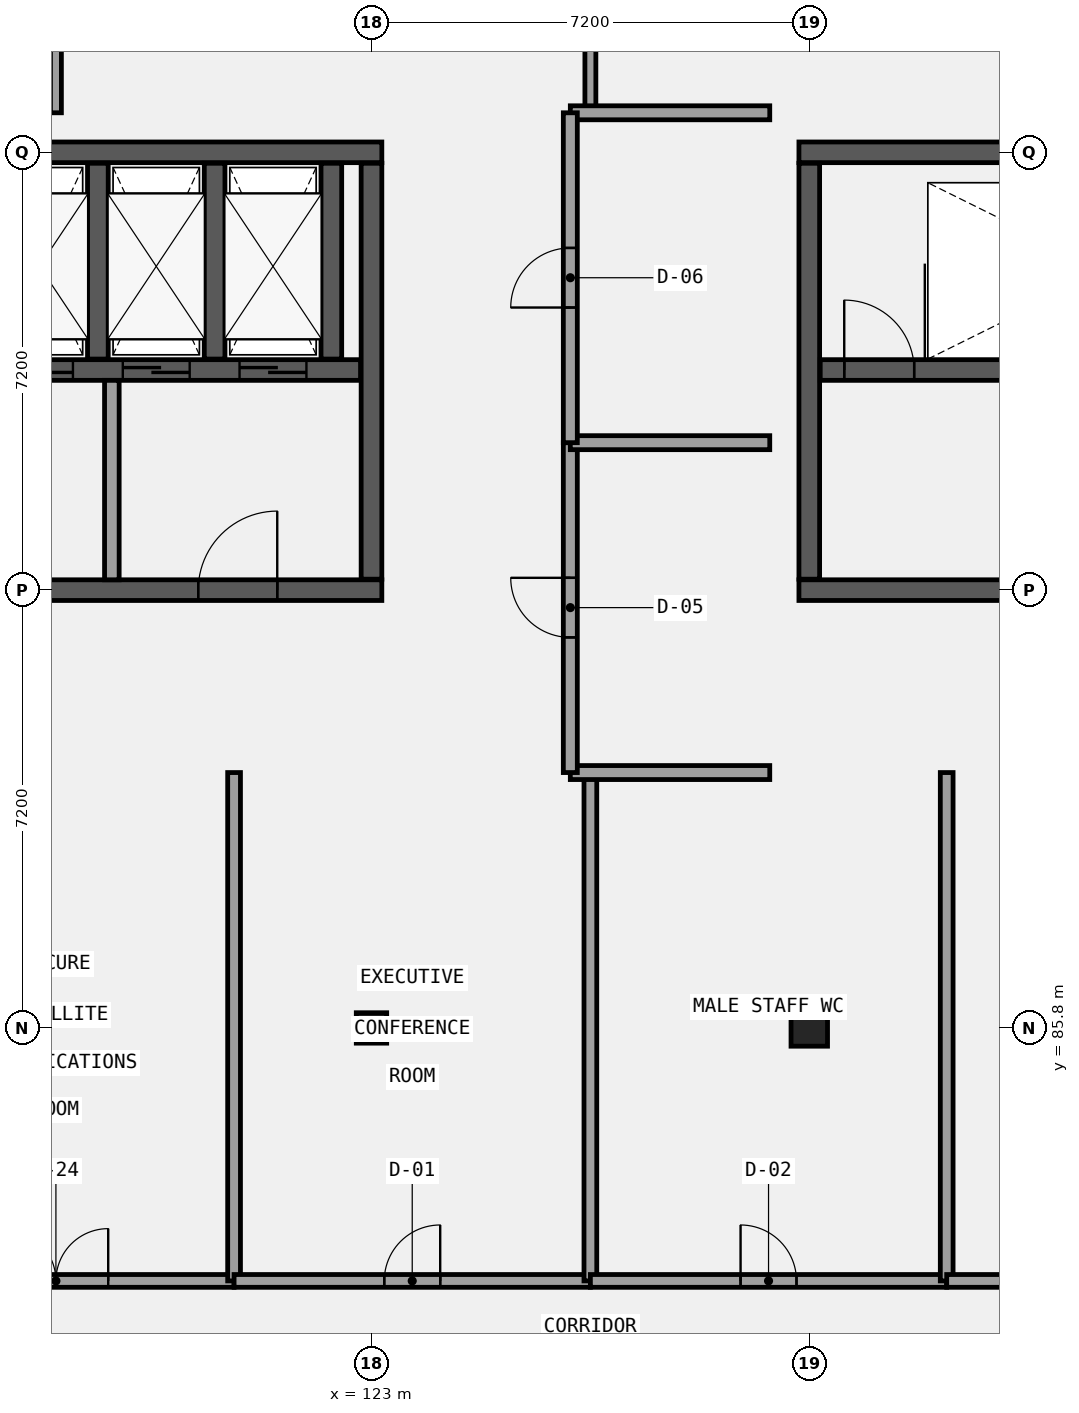
"""IFC4 building model, lengths in metres.
Left out: names, types, materials, properties, quantities, classifications, styles, units other than length and angle.
Written with IfcOpenShell. Run it as: python <this file> out.ifc"""

import sys

from ifc_helpers import new_model, si_unit, direction, frame, frame_2d, origin, origin_2d, place, context, subcontext, project, spatial, rectangle, extrude, element, fill, save


model = new_model("IFC4")
c1 = context("Model", 3, precision=1e-05, world=origin(), true_north=direction((0.0, 1.0)))
c2 = subcontext(c1, "Body", "Model", "MODEL_VIEW")
j1 = project(units=[si_unit("LENGTHUNIT", "METRE"), si_unit("PLANEANGLEUNIT", "RADIAN")], contexts=[c1])
p1 = place(None, origin())
s1 = spatial("IfcSite", under=j1, at=p1, CompositionType="ELEMENT")
p2 = place(p1, origin())
s2 = spatial("IfcBuilding", under=s1, at=p2, CompositionType="ELEMENT")
p3 = place(p2, frame((0.0, 0.0, 30.9)))
s3 = spatial("IfcBuildingStorey", under=s2, at=p3, CompositionType="ELEMENT", Elevation=30.9)
p4 = place(p3, frame((108.43, 100.2, 0.0), z_axis=(0.0, 0.0, 1.0), x_axis=(1.0, 0.0, 0.0)))
e1 = element("IfcWall", 1, at=p4, inside=s3, PredefinedType="SHEAR", context=c2, shape_type="SweptSolid", body=[
    extrude(rectangle(XDim=14.74, YDim=0.34, at=frame_2d((7.37, 0.0))), origin(), (0.0, 0.0, 1.0), 4.5),
])
p5 = place(p3, frame((108.43, 93.0, 0.0), z_axis=(0.0, 0.0, 1.0), x_axis=(1.0, 0.0, 0.0)))
e2 = element("IfcWall", 2, at=p5, inside=s3, PredefinedType="SHEAR", context=c2, shape_type="SweptSolid", body=[
    extrude(rectangle(XDim=14.74, YDim=0.34, at=frame_2d((7.37, 0.0))), origin(), (0.0, 0.0, 1.0), 4.5),
])
p6 = place(p5, frame((3.72, 0.0, 0.0)))
e3 = element("IfcOpeningElement", 3, at=p6, cuts=e2, PredefinedType="OPENING", context=c2, shape_type="SweptSolid", body=[
    extrude(rectangle(XDim=1.3, YDim=2.2, at=frame_2d((0.65, 1.1))), frame((0.0, 0.18, 0.0), z_axis=(0.0, -1.0, 0.0), x_axis=(1.0, 0.0, 0.0)), (0.0, 0.0, 1.0), 0.36),
])
p7 = place(p5, frame((11.72, 0.0, 0.0)))
e4 = element("IfcOpeningElement", 4, at=p7, cuts=e2, PredefinedType="OPENING", context=c2, shape_type="SweptSolid", body=[
    extrude(rectangle(XDim=1.3, YDim=2.2, at=frame_2d((0.65, 1.1))), frame((0.0, 0.18, 0.0), z_axis=(0.0, -1.0, 0.0), x_axis=(1.0, 0.0, 0.0)), (0.0, 0.0, 1.0), 0.36),
])
p8 = place(p3, frame((123.0, 93.18, 0.0), z_axis=(0.0, 0.0, 1.0), x_axis=(0.0, 1.0, 0.0)))
e5 = element("IfcWall", 5, at=p8, inside=s3, PredefinedType="SHEAR", context=c2, shape_type="SweptSolid", body=[
    extrude(rectangle(XDim=6.84, YDim=0.34, at=frame_2d((3.42, 0.0))), origin(), (0.0, 0.0, 1.0), 4.5),
])
p9 = place(p3, frame((108.78, 96.62, 0.0), z_axis=(0.0, 0.0, 1.0), x_axis=(1.0, 0.0, 0.0)))
e6 = element("IfcWall", 6, at=p9, inside=s3, PredefinedType="SHEAR", context=c2, shape_type="SweptSolid", body=[
    extrude(rectangle(XDim=14.04, YDim=0.34, at=frame_2d((7.02, 0.0))), origin(), (0.0, 0.0, 1.0), 4.5),
])
p10 = place(p9, frame((8.21, 0.0, 0.0)))
e7 = element("IfcOpeningElement", 7, at=p10, cuts=e6, PredefinedType="OPENING", context=c2, shape_type="SweptSolid", body=[
    extrude(rectangle(XDim=1.1, YDim=2.15, at=frame_2d((0.55, 1.075))), frame((0.0, 0.18, 0.0), z_axis=(0.0, -1.0, 0.0), x_axis=(1.0, 0.0, 0.0)), (0.0, 0.0, 1.0), 0.36),
])
p11 = place(p9, frame((10.13, 0.0, 0.0)))
e8 = element("IfcOpeningElement", 8, at=p11, cuts=e6, PredefinedType="OPENING", context=c2, shape_type="SweptSolid", body=[
    extrude(rectangle(XDim=1.1, YDim=2.15, at=frame_2d((0.55, 1.075))), frame((0.0, 0.18, 0.0), z_axis=(0.0, -1.0, 0.0), x_axis=(1.0, 0.0, 0.0)), (0.0, 0.0, 1.0), 0.36),
])
p12 = place(p9, frame((12.05, 0.0, 0.0)))
e9 = element("IfcOpeningElement", 9, at=p12, cuts=e6, PredefinedType="OPENING", context=c2, shape_type="SweptSolid", body=[
    extrude(rectangle(XDim=1.1, YDim=2.15, at=frame_2d((0.55, 1.075))), frame((0.0, 0.18, 0.0), z_axis=(0.0, -1.0, 0.0), x_axis=(1.0, 0.0, 0.0)), (0.0, 0.0, 1.0), 0.36),
])
p13 = place(p9, frame((0.395, 0.0, 0.0)))
e10 = element("IfcOpeningElement", 10, at=p13, cuts=e6, PredefinedType="OPENING", context=c2, shape_type="SweptSolid", body=[
    extrude(rectangle(XDim=1.15, YDim=2.15, at=frame_2d((0.575, 1.075))), frame((0.0, 0.18, 0.0), z_axis=(0.0, -1.0, 0.0), x_axis=(1.0, 0.0, 0.0)), (0.0, 0.0, 1.0), 0.36),
])
for number, where, z_axis, x_axis in (
    (11, (118.5, 96.8, 0.0), (0.0, 0.0, 1.0), (0.0, 1.0, 0.0)),
    (12, (120.42, 96.8, 0.0), (0.0, 0.0, 1.0), (0.0, 1.0, 0.0)),
    (13, (122.34, 96.8, 0.0), (0.0, 0.0, 1.0), (0.0, 1.0, 0.0)),
):
    element("IfcWall", number, at=place(p3, frame(where, z_axis=z_axis, x_axis=x_axis)), inside=s3, PredefinedType="SHEAR", context=c2, shape_type="SweptSolid", body=[
        extrude(rectangle(XDim=3.22, YDim=0.34, at=frame_2d((1.61, 0.0))), origin(), (0.0, 0.0, 1.0), 4.5),
    ])
p14 = place(p3, frame((130.03, 100.2, 0.0), z_axis=(0.0, 0.0, 1.0), x_axis=(1.0, 0.0, 0.0)))
e14 = element("IfcWall", 14, at=p14, inside=s3, PredefinedType="SHEAR", context=c2, shape_type="SweptSolid", body=[
    extrude(rectangle(XDim=14.74, YDim=0.34, at=frame_2d((7.37, 0.0))), origin(), (0.0, 0.0, 1.0), 4.5),
])
p15 = place(p3, frame((130.03, 93.0, 0.0), z_axis=(0.0, 0.0, 1.0), x_axis=(1.0, 0.0, 0.0)))
e15 = element("IfcWall", 15, at=p15, inside=s3, PredefinedType="SHEAR", context=c2, shape_type="SweptSolid", body=[
    extrude(rectangle(XDim=14.74, YDim=0.34, at=frame_2d((7.37, 0.0))), origin(), (0.0, 0.0, 1.0), 4.5),
])
p16 = place(p15, frame((3.72, 0.0, 0.0)))
e16 = element("IfcOpeningElement", 16, at=p16, cuts=e15, PredefinedType="OPENING", context=c2, shape_type="SweptSolid", body=[
    extrude(rectangle(XDim=1.3, YDim=2.2, at=frame_2d((0.65, 1.1))), frame((0.0, 0.18, 0.0), z_axis=(0.0, -1.0, 0.0), x_axis=(1.0, 0.0, 0.0)), (0.0, 0.0, 1.0), 0.36),
])
p17 = place(p15, frame((11.72, 0.0, 0.0)))
e17 = element("IfcOpeningElement", 17, at=p17, cuts=e15, PredefinedType="OPENING", context=c2, shape_type="SweptSolid", body=[
    extrude(rectangle(XDim=1.3, YDim=2.2, at=frame_2d((0.65, 1.1))), frame((0.0, 0.18, 0.0), z_axis=(0.0, -1.0, 0.0), x_axis=(1.0, 0.0, 0.0)), (0.0, 0.0, 1.0), 0.36),
])
p18 = place(p3, frame((130.2, 93.18, 0.0), z_axis=(0.0, 0.0, 1.0), x_axis=(0.0, 1.0, 0.0)))
e18 = element("IfcWall", 18, at=p18, inside=s3, PredefinedType="SHEAR", context=c2, shape_type="SweptSolid", body=[
    extrude(rectangle(XDim=6.84, YDim=0.34, at=frame_2d((3.42, 0.0))), origin(), (0.0, 0.0, 1.0), 4.5),
])
p19 = place(p3, frame((130.38, 96.62, 0.0), z_axis=(0.0, 0.0, 1.0), x_axis=(1.0, 0.0, 0.0)))
e19 = element("IfcWall", 19, at=p19, inside=s3, PredefinedType="SHEAR", context=c2, shape_type="SweptSolid", body=[
    extrude(rectangle(XDim=14.04, YDim=0.34, at=frame_2d((7.02, 0.0))), origin(), (0.0, 0.0, 1.0), 4.5),
])
p20 = place(p19, frame((8.21, 0.0, 0.0)))
e20 = element("IfcOpeningElement", 20, at=p20, cuts=e19, PredefinedType="OPENING", context=c2, shape_type="SweptSolid", body=[
    extrude(rectangle(XDim=1.1, YDim=2.15, at=frame_2d((0.55, 1.075))), frame((0.0, 0.18, 0.0), z_axis=(0.0, -1.0, 0.0), x_axis=(1.0, 0.0, 0.0)), (0.0, 0.0, 1.0), 0.36),
])
p21 = place(p19, frame((10.13, 0.0, 0.0)))
e21 = element("IfcOpeningElement", 21, at=p21, cuts=e19, PredefinedType="OPENING", context=c2, shape_type="SweptSolid", body=[
    extrude(rectangle(XDim=1.1, YDim=2.15, at=frame_2d((0.55, 1.075))), frame((0.0, 0.18, 0.0), z_axis=(0.0, -1.0, 0.0), x_axis=(1.0, 0.0, 0.0)), (0.0, 0.0, 1.0), 0.36),
])
p22 = place(p19, frame((12.05, 0.0, 0.0)))
e22 = element("IfcOpeningElement", 22, at=p22, cuts=e19, PredefinedType="OPENING", context=c2, shape_type="SweptSolid", body=[
    extrude(rectangle(XDim=1.1, YDim=2.15, at=frame_2d((0.55, 1.075))), frame((0.0, 0.18, 0.0), z_axis=(0.0, -1.0, 0.0), x_axis=(1.0, 0.0, 0.0)), (0.0, 0.0, 1.0), 0.36),
])
p23 = place(p19, frame((0.395, 0.0, 0.0)))
e23 = element("IfcOpeningElement", 23, at=p23, cuts=e19, PredefinedType="OPENING", context=c2, shape_type="SweptSolid", body=[
    extrude(rectangle(XDim=1.15, YDim=2.15, at=frame_2d((0.575, 1.075))), frame((0.0, 0.18, 0.0), z_axis=(0.0, -1.0, 0.0), x_axis=(1.0, 0.0, 0.0)), (0.0, 0.0, 1.0), 0.36),
])
p24 = place(p3, frame((123.0, 85.8, 0.0), z_axis=(0.0, 0.0, 1.0), x_axis=(1.0, 0.0, 0.0)))
e24 = element("IfcColumn", 24, at=p24, inside=s3, PredefinedType="COLUMN", context=c2, shape_type="SweptSolid", body=[
    extrude(rectangle(XDim=0.5, YDim=0.5, at=origin_2d()), origin(), (0.0, 0.0, 1.0), 4.5),
])
p25 = place(p3, frame((130.2, 85.8, 0.0), z_axis=(0.0, 0.0, 1.0), x_axis=(1.0, 0.0, 0.0)))
e25 = element("IfcColumn", 25, at=p25, inside=s3, PredefinedType="COLUMN", context=c2, shape_type="SweptSolid", body=[
    extrude(rectangle(XDim=0.6, YDim=0.6, at=origin_2d()), origin(), (0.0, 0.0, 1.0), 4.5),
])
p26 = place(p3, frame((118.73, 93.17, 0.0), z_axis=(0.0, 0.0, 1.0), x_axis=(0.0, 1.0, 0.0)))
e26 = element("IfcWall", 26, at=p26, inside=s3, PredefinedType="SOLIDWALL", context=c2, shape_type="SweptSolid", body=[
    extrude(rectangle(XDim=3.28, YDim=0.24, at=frame_2d((1.64, 0.0))), origin(), (0.0, 0.0, 1.0), 4.22),
])
for number, where, z_axis, x_axis in (
    (27, (117.81, 100.85, 0.0), (0.0, 0.0, 1.0), (0.0, 1.0, 0.0)),
    (28, (126.6, 100.85, 0.0), (0.0, 0.0, 1.0), (0.0, 1.0, 0.0)),
):
    element("IfcWall", number, at=place(p3, frame(where, z_axis=z_axis, x_axis=x_axis)), inside=s3, PredefinedType="PARTITIONING", context=c2, shape_type="SweptSolid", body=[
        extrude(rectangle(XDim=7.29, YDim=0.18, at=frame_2d((3.645, 0.0))), origin(), (0.0, 0.0, 1.0), 4.25),
    ])
p27 = place(p3, frame((114.88, 81.64, 0.0), z_axis=(0.0, 0.0, 1.0), x_axis=(1.0, 0.0, 0.0)))
e29 = element("IfcWall", 29, at=p27, inside=s3, PredefinedType="PARTITIONING", context=c2, shape_type="SweptSolid", body=[
    extrude(rectangle(XDim=5.86, YDim=0.21, at=frame_2d((2.93, 0.0))), origin(), (0.0, 0.0, 1.0), 4.25),
])
p28 = place(p27, frame((2.07, 0.0, 0.0)))
e30 = element("IfcOpeningElement", 30, at=p28, cuts=e29, PredefinedType="OPENING", context=c2, shape_type="SweptSolid", body=[
    extrude(rectangle(XDim=1.72, YDim=2.35, at=frame_2d((0.86, 1.175))), frame((0.0, 0.115, 0.0), z_axis=(0.0, -1.0, 0.0), x_axis=(1.0, 0.0, 0.0)), (0.0, 0.0, 1.0), 0.23),
])
p29 = place(p3, frame((120.74, 81.64, 0.0), z_axis=(0.0, 0.0, 1.0), x_axis=(0.0, 1.0, 0.0)))
e31 = element("IfcWall", 31, at=p29, inside=s3, PredefinedType="PARTITIONING", context=c2, shape_type="SweptSolid", body=[
    extrude(rectangle(XDim=8.36, YDim=0.21, at=frame_2d((4.18, 0.0))), origin(), (0.0, 0.0, 1.0), 4.25),
])
p30 = place(p3, frame((120.74, 81.64, 0.0), z_axis=(0.0, 0.0, 1.0), x_axis=(1.0, 0.0, 0.0)))
e32 = element("IfcWall", 32, at=p30, inside=s3, PredefinedType="PARTITIONING", context=c2, shape_type="SweptSolid", body=[
    extrude(rectangle(XDim=5.86, YDim=0.21, at=frame_2d((2.93, 0.0))), origin(), (0.0, 0.0, 1.0), 4.25),
])
p31 = place(p30, frame((2.47, 0.0, 0.0)))
e33 = element("IfcOpeningElement", 33, at=p31, cuts=e32, PredefinedType="OPENING", context=c2, shape_type="SweptSolid", body=[
    extrude(rectangle(XDim=0.92, YDim=2.1, at=frame_2d((0.46, 1.05))), frame((0.0, 0.115, 0.0), z_axis=(0.0, -1.0, 0.0), x_axis=(1.0, 0.0, 0.0)), (0.0, 0.0, 1.0), 0.23),
])
p32 = place(p3, frame((126.6, 81.64, 0.0), z_axis=(0.0, 0.0, 1.0), x_axis=(0.0, 1.0, 0.0)))
e34 = element("IfcWall", 34, at=p32, inside=s3, PredefinedType="PARTITIONING", context=c2, shape_type="SweptSolid", body=[
    extrude(rectangle(XDim=8.36, YDim=0.21, at=frame_2d((4.18, 0.0))), origin(), (0.0, 0.0, 1.0), 4.25),
])
p33 = place(p3, frame((126.6, 81.64, 0.0), z_axis=(0.0, 0.0, 1.0), x_axis=(1.0, 0.0, 0.0)))
e35 = element("IfcWall", 35, at=p33, inside=s3, PredefinedType="PARTITIONING", context=c2, shape_type="SweptSolid", body=[
    extrude(rectangle(XDim=5.86, YDim=0.21, at=frame_2d((2.93, 0.0))), origin(), (0.0, 0.0, 1.0), 4.25),
])
p34 = place(p33, frame((2.47, 0.0, 0.0)))
e36 = element("IfcOpeningElement", 36, at=p34, cuts=e35, PredefinedType="OPENING", context=c2, shape_type="SweptSolid", body=[
    extrude(rectangle(XDim=0.92, YDim=2.22, at=frame_2d((0.46, 1.11))), frame((0.0, 0.115, 0.0), z_axis=(0.0, -1.0, 0.0), x_axis=(1.0, 0.0, 0.0)), (0.0, 0.0, 1.0), 0.23),
])
p35 = place(p3, frame((132.46, 81.64, 0.0), z_axis=(0.0, 0.0, 1.0), x_axis=(0.0, 1.0, 0.0)))
e37 = element("IfcWall", 37, at=p35, inside=s3, PredefinedType="PARTITIONING", context=c2, shape_type="SweptSolid", body=[
    extrude(rectangle(XDim=8.36, YDim=0.21, at=frame_2d((4.18, 0.0))), origin(), (0.0, 0.0, 1.0), 4.25),
])
p36 = place(p3, frame((132.46, 81.64, 0.0), z_axis=(0.0, 0.0, 1.0), x_axis=(1.0, 0.0, 0.0)))
e38 = element("IfcWall", 38, at=p36, inside=s3, PredefinedType="PARTITIONING", context=c2, shape_type="SweptSolid", body=[
    extrude(rectangle(XDim=5.86, YDim=0.21, at=frame_2d((2.93, 0.0))), origin(), (0.0, 0.0, 1.0), 4.25),
])
p37 = place(p36, frame((2.47, 0.0, 0.0)))
e39 = element("IfcOpeningElement", 39, at=p37, cuts=e38, PredefinedType="OPENING", context=c2, shape_type="SweptSolid", body=[
    extrude(rectangle(XDim=0.92, YDim=2.35, at=frame_2d((0.46, 1.175))), frame((0.0, 0.115, 0.0), z_axis=(0.0, -1.0, 0.0), x_axis=(1.0, 0.0, 0.0)), (0.0, 0.0, 1.0), 0.23),
])
for number, where, z_axis, x_axis in (
    (40, (126.27, 90.0, 0.0), (0.0, 0.0, 1.0), (1.0, 0.0, 0.0)),
    (41, (126.27, 100.85, 0.0), (0.0, 0.0, 1.0), (1.0, 0.0, 0.0)),
):
    element("IfcWall", number, at=place(p3, frame(where, z_axis=z_axis, x_axis=x_axis)), inside=s3, PredefinedType="PARTITIONING", context=c2, shape_type="SweptSolid", body=[
        extrude(rectangle(XDim=3.28, YDim=0.23, at=frame_2d((1.64, 0.0))), origin(), (0.0, 0.0, 1.0), 4.25),
    ])
p38 = place(p3, frame((126.27, 90.0, 0.0), z_axis=(0.0, 0.0, 1.0), x_axis=(0.0, 1.0, 0.0)))
e42 = element("IfcWall", 42, at=p38, inside=s3, PredefinedType="PARTITIONING", context=c2, shape_type="SweptSolid", body=[
    extrude(rectangle(XDim=5.425, YDim=0.23, at=frame_2d((2.712, 0.0))), origin(), (0.0, 0.0, 1.0), 4.25),
])
p39 = place(p38, frame((2.222, 0.0, 0.0)))
e43 = element("IfcOpeningElement", 43, at=p39, cuts=e42, PredefinedType="OPENING", context=c2, shape_type="SweptSolid", body=[
    extrude(rectangle(XDim=0.98, YDim=2.22, at=frame_2d((0.49, 1.11))), frame((0.0, 0.125, 0.0), z_axis=(0.0, -1.0, 0.0), x_axis=(1.0, 0.0, 0.0)), (0.0, 0.0, 1.0), 0.25),
])
p40 = place(p3, frame((126.27, 95.425, 0.0), z_axis=(0.0, 0.0, 1.0), x_axis=(1.0, 0.0, 0.0)))
e44 = element("IfcWall", 44, at=p40, inside=s3, PredefinedType="PARTITIONING", context=c2, shape_type="SweptSolid", body=[
    extrude(rectangle(XDim=3.28, YDim=0.23, at=frame_2d((1.64, 0.0))), origin(), (0.0, 0.0, 1.0), 4.25),
])
p41 = place(p3, frame((126.27, 95.425, 0.0), z_axis=(0.0, 0.0, 1.0), x_axis=(0.0, 1.0, 0.0)))
e45 = element("IfcWall", 45, at=p41, inside=s3, PredefinedType="PARTITIONING", context=c2, shape_type="SweptSolid", body=[
    extrude(rectangle(XDim=5.425, YDim=0.23, at=frame_2d((2.712, 0.0))), origin(), (0.0, 0.0, 1.0), 4.25),
])
p42 = place(p41, frame((2.222, 0.0, 0.0)))
e46 = element("IfcOpeningElement", 46, at=p42, cuts=e45, PredefinedType="OPENING", context=c2, shape_type="SweptSolid", body=[
    extrude(rectangle(XDim=0.98, YDim=2.35, at=frame_2d((0.49, 1.175))), frame((0.0, 0.125, 0.0), z_axis=(0.0, -1.0, 0.0), x_axis=(1.0, 0.0, 0.0)), (0.0, 0.0, 1.0), 0.25),
])
p43 = place(p10, frame((1.1, 0.0, 0.0), z_axis=(0.0, 0.0, 1.0), x_axis=(-1.0, 0.0, 0.0)))
e47 = element("IfcDoor", 47, at=p43, inside=s3, OperationType="DOUBLE_DOOR_SLIDING", PredefinedType="DOOR", context=c2, shape_type="SweptSolid", body=[
    extrude(rectangle(XDim=1.1, YDim=2.15, at=frame_2d((0.55, 1.075))), frame((0.0, 0.025, 0.0), z_axis=(0.0, -1.0, 0.0), x_axis=(1.0, 0.0, 0.0)), (0.0, 0.0, 1.0), 0.05),
])
fill(e7, e47)
p44 = place(p11, frame((1.1, 0.0, 0.0), z_axis=(0.0, 0.0, 1.0), x_axis=(-1.0, 0.0, 0.0)))
e48 = element("IfcDoor", 48, at=p44, inside=s3, OperationType="DOUBLE_DOOR_SLIDING", PredefinedType="DOOR", context=c2, shape_type="SweptSolid", body=[
    extrude(rectangle(XDim=1.1, YDim=2.15, at=frame_2d((0.55, 1.075))), frame((0.0, 0.025, 0.0), z_axis=(0.0, -1.0, 0.0), x_axis=(1.0, 0.0, 0.0)), (0.0, 0.0, 1.0), 0.05),
])
fill(e8, e48)
p45 = place(p12, frame((1.1, 0.0, 0.0), z_axis=(0.0, 0.0, 1.0), x_axis=(-1.0, 0.0, 0.0)))
e49 = element("IfcDoor", 49, at=p45, inside=s3, OperationType="DOUBLE_DOOR_SLIDING", PredefinedType="DOOR", context=c2, shape_type="SweptSolid", body=[
    extrude(rectangle(XDim=1.1, YDim=2.15, at=frame_2d((0.55, 1.075))), frame((0.0, 0.025, 0.0), z_axis=(0.0, -1.0, 0.0), x_axis=(1.0, 0.0, 0.0)), (0.0, 0.0, 1.0), 0.05),
])
fill(e9, e49)
p46 = place(p7, frame((1.3, 0.0, 0.0), z_axis=(0.0, 0.0, 1.0), x_axis=(-1.0, 0.0, 0.0)))
e50 = element("IfcDoor", 50, at=p46, inside=s3, OperationType="SINGLE_SWING_RIGHT", PredefinedType="DOOR", context=c2, shape_type="SweptSolid", body=[
    extrude(rectangle(XDim=1.3, YDim=2.2, at=frame_2d((0.65, 1.1))), frame((0.0, 0.025, 0.0), z_axis=(0.0, -1.0, 0.0), x_axis=(1.0, 0.0, 0.0)), (0.0, 0.0, 1.0), 0.05),
])
fill(e4, e50)
p47 = place(p23, origin())
e51 = element("IfcDoor", 51, at=p47, inside=s3, OperationType="SINGLE_SWING_LEFT", PredefinedType="DOOR", context=c2, shape_type="SweptSolid", body=[
    extrude(rectangle(XDim=1.15, YDim=2.15, at=frame_2d((0.575, 1.075))), frame((0.0, 0.025, 0.0), z_axis=(0.0, -1.0, 0.0), x_axis=(1.0, 0.0, 0.0)), (0.0, 0.0, 1.0), 0.05),
])
fill(e23, e51)
p48 = place(p28, origin())
e52 = element("IfcDoor", 52, at=p48, inside=s3, OperationType="DOUBLE_DOOR_SINGLE_SWING", PredefinedType="DOOR", context=c2, shape_type="SweptSolid", body=[
    extrude(rectangle(XDim=1.72, YDim=2.35, at=frame_2d((0.86, 1.175))), frame((0.0, 0.025, 0.0), z_axis=(0.0, -1.0, 0.0), x_axis=(1.0, 0.0, 0.0)), (0.0, 0.0, 1.0), 0.05),
])
fill(e30, e52)
p49 = place(p31, origin())
e53 = element("IfcDoor", 53, at=p49, inside=s3, OperationType="SINGLE_SWING_RIGHT", PredefinedType="DOOR", context=c2, shape_type="SweptSolid", body=[
    extrude(rectangle(XDim=0.92, YDim=2.1, at=frame_2d((0.46, 1.05))), frame((0.0, 0.025, 0.0), z_axis=(0.0, -1.0, 0.0), x_axis=(1.0, 0.0, 0.0)), (0.0, 0.0, 1.0), 0.05),
])
fill(e33, e53)
p50 = place(p34, origin())
e54 = element("IfcDoor", 54, at=p50, inside=s3, OperationType="SINGLE_SWING_LEFT", PredefinedType="DOOR", context=c2, shape_type="SweptSolid", body=[
    extrude(rectangle(XDim=0.92, YDim=2.22, at=frame_2d((0.46, 1.11))), frame((0.0, 0.025, 0.0), z_axis=(0.0, -1.0, 0.0), x_axis=(1.0, 0.0, 0.0)), (0.0, 0.0, 1.0), 0.05),
])
fill(e36, e54)
p51 = place(p39, origin())
e55 = element("IfcDoor", 55, at=p51, inside=s3, OperationType="SINGLE_SWING_RIGHT", PredefinedType="DOOR", context=c2, shape_type="SweptSolid", body=[
    extrude(rectangle(XDim=0.98, YDim=2.22, at=frame_2d((0.49, 1.11))), frame((0.0, 0.025, 0.0), z_axis=(0.0, -1.0, 0.0), x_axis=(1.0, 0.0, 0.0)), (0.0, 0.0, 1.0), 0.05),
])
fill(e43, e55)
p52 = place(p42, origin())
e56 = element("IfcDoor", 56, at=p52, inside=s3, OperationType="SINGLE_SWING_LEFT", PredefinedType="DOOR", context=c2, shape_type="SweptSolid", body=[
    extrude(rectangle(XDim=0.98, YDim=2.35, at=frame_2d((0.49, 1.175))), frame((0.0, 0.025, 0.0), z_axis=(0.0, -1.0, 0.0), x_axis=(1.0, 0.0, 0.0)), (0.0, 0.0, 1.0), 0.05),
])
fill(e46, e56)
save(model, sys.argv[1])
